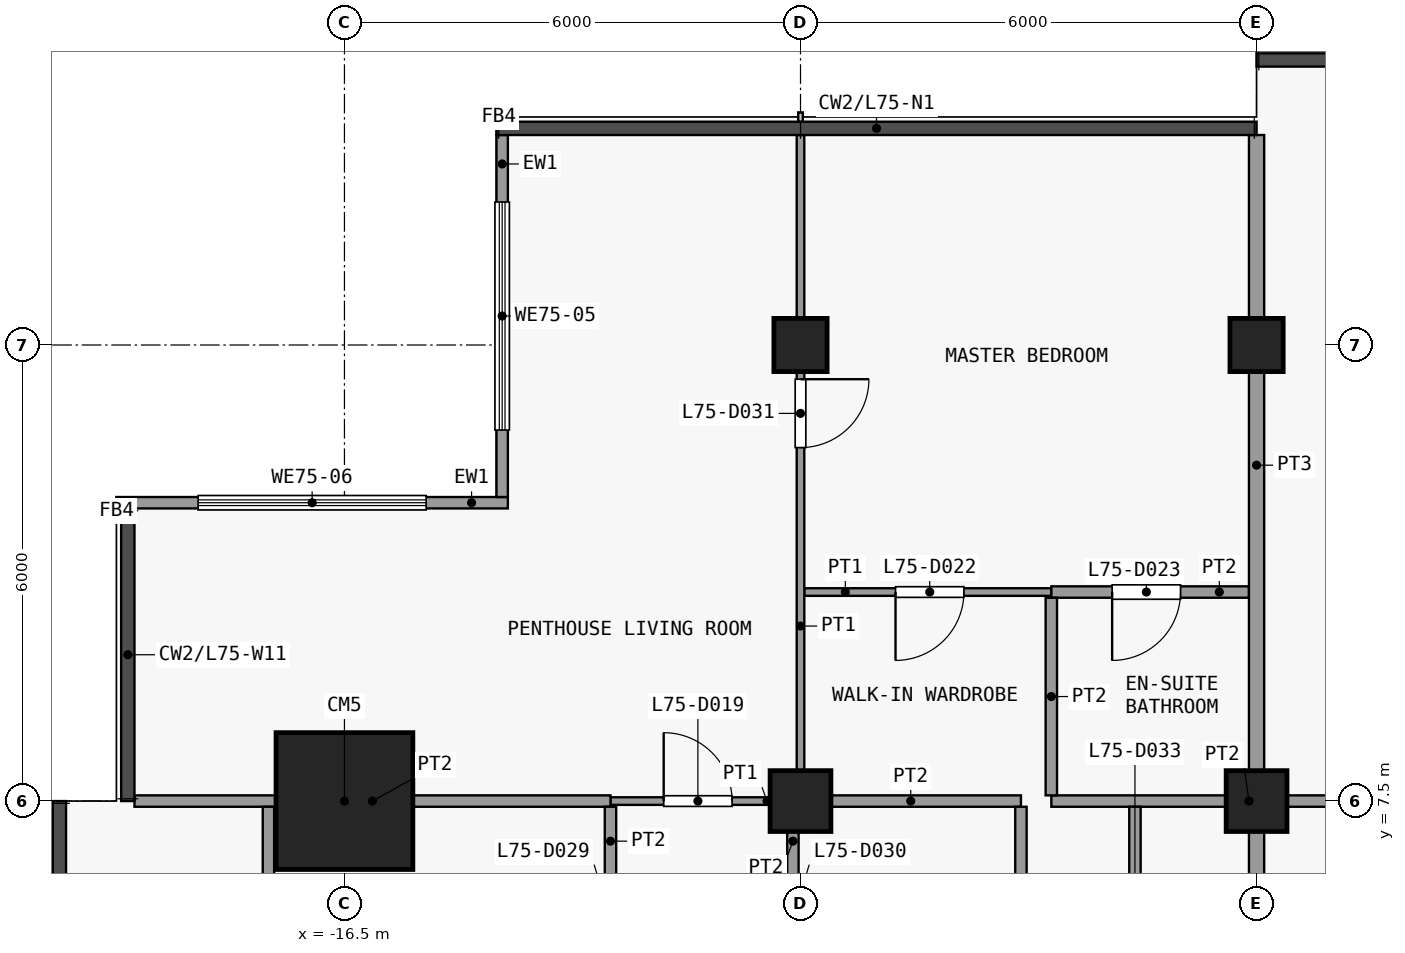
"""IFC4 building model, lengths in metres.
Left out: names, types, materials, properties, quantities, classifications, styles, units other than length and angle.
Written with IfcOpenShell. Run it as: python <this file> out.ifc"""

import sys

from ifc_helpers import new_model, si_unit, direction, frame, frame_2d, origin, origin_2d, place, context, subcontext, project, spatial, rectangle, extrude, element, fill, save


model = new_model("IFC4")
c1 = context("Model", 3, precision=1e-05, world=origin(), true_north=direction((0.0, 1.0)))
c2 = subcontext(c1, "Body", "Model", "MODEL_VIEW")
j1 = project(units=[si_unit("LENGTHUNIT", "METRE"), si_unit("PLANEANGLEUNIT", "RADIAN")], contexts=[c1])
p1 = place(None, origin())
s1 = spatial("IfcSite", under=j1, at=p1, CompositionType="ELEMENT")
p2 = place(p1, origin())
s2 = spatial("IfcBuilding", under=s1, at=p2, CompositionType="ELEMENT")
p3 = place(p2, frame((0.0, 0.0, 295.1)))
s3 = spatial("IfcBuildingStorey", under=s2, at=p3, CompositionType="ELEMENT", Elevation=295.1)
p4 = place(p3, frame((-16.5, 7.5, 0.0), z_axis=(0.0, 0.0, 1.0), x_axis=(1.0, 0.0, 0.0)))
e1 = element("IfcColumn", 1, at=p4, inside=s3, PredefinedType="COLUMN", context=c2, shape_type="SweptSolid", body=[
    extrude(rectangle(XDim=1.8, YDim=1.8, at=origin_2d()), origin(), (0.0, 0.0, 1.0), 3.6),
])
p5 = place(p3, frame((-10.5, 7.5, 0.0), z_axis=(0.0, 0.0, 1.0), x_axis=(1.0, 0.0, 0.0)))
e2 = element("IfcColumn", 2, at=p5, inside=s3, PredefinedType="COLUMN", context=c2, shape_type="SweptSolid", body=[
    extrude(rectangle(XDim=0.8, YDim=0.8, at=origin_2d()), origin(), (0.0, 0.0, 1.0), 3.6),
])
p6 = place(p3, frame((-10.5, 13.5, 0.0), z_axis=(0.0, 0.0, 1.0), x_axis=(1.0, 0.0, 0.0)))
e3 = element("IfcColumn", 3, at=p6, inside=s3, PredefinedType="COLUMN", context=c2, shape_type="SweptSolid", body=[
    extrude(rectangle(XDim=0.7, YDim=0.7, at=origin_2d()), origin(), (0.0, 0.0, 1.0), 3.6),
])
p7 = place(p3, frame((-4.5, 7.5, 0.0), z_axis=(0.0, 0.0, 1.0), x_axis=(1.0, 0.0, 0.0)))
e4 = element("IfcColumn", 4, at=p7, inside=s3, PredefinedType="COLUMN", context=c2, shape_type="SweptSolid", body=[
    extrude(rectangle(XDim=0.8, YDim=0.8, at=origin_2d()), origin(), (0.0, 0.0, 1.0), 3.6),
])
p8 = place(p3, frame((-4.5, 13.5, 0.0), z_axis=(0.0, 0.0, 1.0), x_axis=(1.0, 0.0, 0.0)))
e5 = element("IfcColumn", 5, at=p8, inside=s3, PredefinedType="COLUMN", context=c2, shape_type="SweptSolid", body=[
    extrude(rectangle(XDim=0.7, YDim=0.7, at=origin_2d()), origin(), (0.0, 0.0, 1.0), 3.6),
])
p9 = place(p3, frame((-14.425, 11.5, 0.0), z_axis=(0.0, 0.0, 1.0), x_axis=(0.0, 1.0, 0.0)))
e6 = element("IfcWall", 6, at=p9, inside=s3, PredefinedType="SOLIDWALL", context=c2, shape_type="SweptSolid", body=[
    extrude(rectangle(XDim=4.762, YDim=0.15, at=frame_2d((2.381, 0.0))), origin(), (0.0, 0.0, 1.0), 3.2),
])
p10 = place(p9, frame((0.881, 0.0, 0.9)))
e7 = element("IfcOpeningElement", 7, at=p10, cuts=e6, PredefinedType="OPENING", context=c2, shape_type="SweptSolid", body=[
    extrude(rectangle(XDim=3.0, YDim=2.4, at=frame_2d((1.5, 1.2))), frame((0.0, 0.085, 0.0), z_axis=(0.0, -1.0, 0.0), x_axis=(1.0, 0.0, 0.0)), (0.0, 0.0, 1.0), 0.17),
])
p11 = place(p3, frame((-19.5, 11.425, 0.0), z_axis=(0.0, 0.0, 1.0), x_axis=(1.0, 0.0, 0.0)))
e8 = element("IfcWall", 8, at=p11, inside=s3, PredefinedType="SOLIDWALL", context=c2, shape_type="SweptSolid", body=[
    extrude(rectangle(XDim=5.15, YDim=0.15, at=frame_2d((2.575, 0.0))), origin(), (0.0, 0.0, 1.0), 3.2),
])
p12 = place(p11, frame((1.075, 0.0, 0.9)))
e9 = element("IfcOpeningElement", 9, at=p12, cuts=e8, PredefinedType="OPENING", context=c2, shape_type="SweptSolid", body=[
    extrude(rectangle(XDim=3.0, YDim=2.4, at=frame_2d((1.5, 1.2))), frame((0.0, 0.085, 0.0), z_axis=(0.0, -1.0, 0.0), x_axis=(1.0, 0.0, 0.0)), (0.0, 0.0, 1.0), 0.17),
])
p13 = place(p3, frame((-13.0, 7.5, 0.0), z_axis=(0.0, 0.0, 1.0), x_axis=(1.0, 0.0, 0.0)))
e10 = element("IfcWall", 10, at=p13, inside=s3, PredefinedType="PARTITIONING", context=c2, shape_type="SweptSolid", body=[
    extrude(rectangle(XDim=2.4, YDim=0.1, at=frame_2d((1.2, 0.0))), origin(), (0.0, 0.0, 1.0), 3.2),
])
p14 = place(p13, frame((0.7, 0.0, 0.0)))
e11 = element("IfcOpeningElement", 11, at=p14, cuts=e10, PredefinedType="OPENING", context=c2, shape_type="SweptSolid", body=[
    extrude(rectangle(XDim=0.9, YDim=2.1, at=frame_2d((0.45, 1.05))), frame((0.0, 0.06, 0.0), z_axis=(0.0, -1.0, 0.0), x_axis=(1.0, 0.0, 0.0)), (0.0, 0.0, 1.0), 0.12),
])
p15 = place(p3, frame((-19.262, 7.5, 0.0), z_axis=(0.0, 0.0, 1.0), x_axis=(1.0, 0.0, 0.0)))
e12 = element("IfcWall", 12, at=p15, inside=s3, PredefinedType="PARTITIONING", context=c2, shape_type="SweptSolid", body=[
    extrude(rectangle(XDim=6.262, YDim=0.15, at=frame_2d((3.131, 0.0))), origin(), (0.0, 0.0, 1.0), 3.2),
])
p16 = place(p3, frame((-10.5, 7.5, 0.0), z_axis=(0.0, 0.0, 1.0), x_axis=(1.0, 0.0, 0.0)))
e13 = element("IfcWall", 13, at=p16, inside=s3, PredefinedType="PARTITIONING", context=c2, shape_type="SweptSolid", body=[
    extrude(rectangle(XDim=2.9, YDim=0.15, at=frame_2d((1.45, 0.0))), origin(), (0.0, 0.0, 1.0), 3.2),
])
p17 = place(p3, frame((-7.2, 7.5, 0.0), z_axis=(0.0, 0.0, 1.0), x_axis=(1.0, 0.0, 0.0)))
e14 = element("IfcWall", 14, at=p17, inside=s3, PredefinedType="PARTITIONING", context=c2, shape_type="SweptSolid", body=[
    extrude(rectangle(XDim=5.2, YDim=0.15, at=frame_2d((2.6, 0.0))), origin(), (0.0, 0.0, 1.0), 3.2),
])
p18 = place(p3, frame((-10.45, 10.25, 0.0), z_axis=(0.0, 0.0, 1.0), x_axis=(1.0, 0.0, 0.0)))
e15 = element("IfcWall", 15, at=p18, inside=s3, PredefinedType="PARTITIONING", context=c2, shape_type="SweptSolid", body=[
    extrude(rectangle(XDim=3.25, YDim=0.1, at=frame_2d((1.625, 0.0))), origin(), (0.0, 0.0, 1.0), 3.2),
])
p19 = place(p18, frame((1.2, 0.0, 0.0)))
e16 = element("IfcOpeningElement", 16, at=p19, cuts=e15, PredefinedType="OPENING", context=c2, shape_type="SweptSolid", body=[
    extrude(rectangle(XDim=0.9, YDim=2.1, at=frame_2d((0.45, 1.05))), frame((0.0, 0.06, 0.0), z_axis=(0.0, -1.0, 0.0), x_axis=(1.0, 0.0, 0.0)), (0.0, 0.0, 1.0), 0.12),
])
p20 = place(p3, frame((-7.2, 10.25, 0.0), z_axis=(0.0, 0.0, 1.0), x_axis=(1.0, 0.0, 0.0)))
e17 = element("IfcWall", 17, at=p20, inside=s3, PredefinedType="PARTITIONING", context=c2, shape_type="SweptSolid", body=[
    extrude(rectangle(XDim=2.6, YDim=0.15, at=frame_2d((1.3, 0.0))), origin(), (0.0, 0.0, 1.0), 3.2),
])
p21 = place(p20, frame((0.8, 0.0, 0.0)))
e18 = element("IfcOpeningElement", 18, at=p21, cuts=e17, PredefinedType="OPENING", context=c2, shape_type="SweptSolid", body=[
    extrude(rectangle(XDim=0.9, YDim=2.1, at=frame_2d((0.45, 1.05))), frame((0.0, 0.085, 0.0), z_axis=(0.0, -1.0, 0.0), x_axis=(1.0, 0.0, 0.0)), (0.0, 0.0, 1.0), 0.17),
])
p22 = place(p3, frame((-17.5, 4.6, 0.0), z_axis=(0.0, 0.0, 1.0), x_axis=(0.0, 1.0, 0.0)))
e19 = element("IfcWall", 19, at=p22, inside=s3, PredefinedType="PARTITIONING", context=c2, shape_type="SweptSolid", body=[
    extrude(rectangle(XDim=2.825, YDim=0.15, at=frame_2d((1.413, 0.0))), origin(), (0.0, 0.0, 1.0), 3.2),
])
p23 = place(p22, frame((1.0, 0.0, 0.0)))
e20 = element("IfcOpeningElement", 20, at=p23, cuts=e19, PredefinedType="OPENING", context=c2, shape_type="SweptSolid", body=[
    extrude(rectangle(XDim=0.9, YDim=2.1, at=frame_2d((0.45, 1.05))), frame((0.0, 0.085, 0.0), z_axis=(0.0, -1.0, 0.0), x_axis=(1.0, 0.0, 0.0)), (0.0, 0.0, 1.0), 0.17),
])
p24 = place(p3, frame((-13.0, 4.6, 0.0), z_axis=(0.0, 0.0, 1.0), x_axis=(0.0, 1.0, 0.0)))
e21 = element("IfcWall", 21, at=p24, inside=s3, PredefinedType="PARTITIONING", context=c2, shape_type="SweptSolid", body=[
    extrude(rectangle(XDim=2.825, YDim=0.15, at=frame_2d((1.413, 0.0))), origin(), (0.0, 0.0, 1.0), 3.2),
])
p25 = place(p24, frame((0.9, 0.0, 0.0)))
e22 = element("IfcOpeningElement", 22, at=p25, cuts=e21, PredefinedType="OPENING", context=c2, shape_type="SweptSolid", body=[
    extrude(rectangle(XDim=0.9, YDim=2.1, at=frame_2d((0.45, 1.05))), frame((0.0, 0.085, 0.0), z_axis=(0.0, -1.0, 0.0), x_axis=(1.0, 0.0, 0.0)), (0.0, 0.0, 1.0), 0.17),
])
p26 = place(p3, frame((-10.6, 4.6, 0.0), z_axis=(0.0, 0.0, 1.0), x_axis=(0.0, 1.0, 0.0)))
e23 = element("IfcWall", 23, at=p26, inside=s3, PredefinedType="PARTITIONING", context=c2, shape_type="SweptSolid", body=[
    extrude(rectangle(XDim=2.825, YDim=0.15, at=frame_2d((1.413, 0.0))), origin(), (0.0, 0.0, 1.0), 3.2),
])
p27 = place(p26, frame((0.9, 0.0, 0.0)))
e24 = element("IfcOpeningElement", 24, at=p27, cuts=e23, PredefinedType="OPENING", context=c2, shape_type="SweptSolid", body=[
    extrude(rectangle(XDim=0.9, YDim=2.1, at=frame_2d((0.45, 1.05))), frame((0.0, 0.085, 0.0), z_axis=(0.0, -1.0, 0.0), x_axis=(1.0, 0.0, 0.0)), (0.0, 0.0, 1.0), 0.17),
])
p28 = place(p3, frame((-10.5, 7.575, 0.0), z_axis=(0.0, 0.0, 1.0), x_axis=(0.0, 1.0, 0.0)))
e25 = element("IfcWall", 25, at=p28, inside=s3, PredefinedType="PARTITIONING", context=c2, shape_type="SweptSolid", body=[
    extrude(rectangle(XDim=8.688, YDim=0.1, at=frame_2d((4.344, 0.0))), origin(), (0.0, 0.0, 1.0), 3.2),
])
p29 = place(p28, frame((4.575, 0.0, 0.0)))
e26 = element("IfcOpeningElement", 26, at=p29, cuts=e25, PredefinedType="OPENING", context=c2, shape_type="SweptSolid", body=[
    extrude(rectangle(XDim=0.9, YDim=2.1, at=frame_2d((0.45, 1.05))), frame((0.0, 0.06, 0.0), z_axis=(0.0, -1.0, 0.0), x_axis=(1.0, 0.0, 0.0)), (0.0, 0.0, 1.0), 0.12),
])
p30 = place(p3, frame((-7.6, 4.6, 0.0), z_axis=(0.0, 0.0, 1.0), x_axis=(0.0, 1.0, 0.0)))
e27 = element("IfcWall", 27, at=p30, inside=s3, PredefinedType="PARTITIONING", context=c2, shape_type="SweptSolid", body=[
    extrude(rectangle(XDim=2.825, YDim=0.15, at=frame_2d((1.413, 0.0))), origin(), (0.0, 0.0, 1.0), 3.2),
])
p31 = place(p30, frame((1.0, 0.0, 0.0)))
e28 = element("IfcOpeningElement", 28, at=p31, cuts=e27, PredefinedType="OPENING", context=c2, shape_type="SweptSolid", body=[
    extrude(rectangle(XDim=0.9, YDim=2.1, at=frame_2d((0.45, 1.05))), frame((0.0, 0.085, 0.0), z_axis=(0.0, -1.0, 0.0), x_axis=(1.0, 0.0, 0.0)), (0.0, 0.0, 1.0), 0.17),
])
p32 = place(p3, frame((-7.2, 7.575, 0.0), z_axis=(0.0, 0.0, 1.0), x_axis=(0.0, 1.0, 0.0)))
e29 = element("IfcWall", 29, at=p32, inside=s3, PredefinedType="PARTITIONING", context=c2, shape_type="SweptSolid", body=[
    extrude(rectangle(XDim=2.6, YDim=0.15, at=frame_2d((1.3, 0.0))), origin(), (0.0, 0.0, 1.0), 3.2),
])
p33 = place(p3, frame((-6.1, 4.6, 0.0), z_axis=(0.0, 0.0, 1.0), x_axis=(0.0, 1.0, 0.0)))
e30 = element("IfcWall", 30, at=p33, inside=s3, PredefinedType="PARTITIONING", context=c2, shape_type="SweptSolid", body=[
    extrude(rectangle(XDim=2.825, YDim=0.15, at=frame_2d((1.413, 0.0))), origin(), (0.0, 0.0, 1.0), 3.2),
])
p34 = place(p33, frame((1.0, 0.0, 0.0)))
e31 = element("IfcOpeningElement", 31, at=p34, cuts=e30, PredefinedType="OPENING", context=c2, shape_type="SweptSolid", body=[
    extrude(rectangle(XDim=0.9, YDim=2.1, at=frame_2d((0.45, 1.05))), frame((0.0, 0.085, 0.0), z_axis=(0.0, -1.0, 0.0), x_axis=(1.0, 0.0, 0.0)), (0.0, 0.0, 1.0), 0.17),
])
p35 = place(p3, frame((-4.5, 4.6, 0.0), z_axis=(0.0, 0.0, 1.0), x_axis=(0.0, 1.0, 0.0)))
e32 = element("IfcWall", 32, at=p35, inside=s3, PredefinedType="PARTITIONING", context=c2, shape_type="SweptSolid", body=[
    extrude(rectangle(XDim=2.825, YDim=0.2, at=frame_2d((1.413, 0.0))), origin(), (0.0, 0.0, 1.0), 3.2),
])
p36 = place(p3, frame((-4.5, 7.575, 0.0), z_axis=(0.0, 0.0, 1.0), x_axis=(0.0, 1.0, 0.0)))
e33 = element("IfcWall", 33, at=p36, inside=s3, PredefinedType="PARTITIONING", context=c2, shape_type="SweptSolid", body=[
    extrude(rectangle(XDim=8.688, YDim=0.2, at=frame_2d((4.344, 0.0))), origin(), (0.0, 0.0, 1.0), 3.2),
])
p37 = place(p10, origin())
e34 = element("IfcWindow", 34, at=p37, inside=s3, PartitioningType="SINGLE_PANEL", PredefinedType="WINDOW", context=c2, shape_type="SweptSolid", body=[
    extrude(rectangle(XDim=3.0, YDim=2.4, at=frame_2d((1.5, 1.2))), frame((0.0, 0.03, 0.0), z_axis=(0.0, -1.0, 0.0), x_axis=(1.0, 0.0, 0.0)), (0.0, 0.0, 1.0), 0.06),
])
fill(e7, e34)
p38 = place(p12, origin())
e35 = element("IfcWindow", 35, at=p38, inside=s3, PartitioningType="SINGLE_PANEL", PredefinedType="WINDOW", context=c2, shape_type="SweptSolid", body=[
    extrude(rectangle(XDim=3.0, YDim=2.4, at=frame_2d((1.5, 1.2))), frame((0.0, 0.03, 0.0), z_axis=(0.0, -1.0, 0.0), x_axis=(1.0, 0.0, 0.0)), (0.0, 0.0, 1.0), 0.06),
])
fill(e9, e35)
p39 = place(p14, origin())
e36 = element("IfcDoor", 36, at=p39, inside=s3, OperationType="SINGLE_SWING_RIGHT", PredefinedType="DOOR", context=c2, shape_type="SweptSolid", body=[
    extrude(rectangle(XDim=0.9, YDim=2.1, at=frame_2d((0.45, 1.05))), frame((0.0, 0.025, 0.0), z_axis=(0.0, -1.0, 0.0), x_axis=(1.0, 0.0, 0.0)), (0.0, 0.0, 1.0), 0.05),
])
fill(e11, e36)
p40 = place(p19, origin())
e37 = element("IfcDoor", 37, at=p40, inside=s3, OperationType="SINGLE_SWING_LEFT", PredefinedType="DOOR", context=c2, shape_type="SweptSolid", body=[
    extrude(rectangle(XDim=0.9, YDim=2.1, at=frame_2d((0.45, 1.05))), frame((0.0, 0.025, 0.0), z_axis=(0.0, -1.0, 0.0), x_axis=(1.0, 0.0, 0.0)), (0.0, 0.0, 1.0), 0.05),
])
fill(e16, e37)
p41 = place(p21, origin())
e38 = element("IfcDoor", 38, at=p41, inside=s3, OperationType="SINGLE_SWING_LEFT", PredefinedType="DOOR", context=c2, shape_type="SweptSolid", body=[
    extrude(rectangle(XDim=0.9, YDim=2.1, at=frame_2d((0.45, 1.05))), frame((0.0, 0.025, 0.0), z_axis=(0.0, -1.0, 0.0), x_axis=(1.0, 0.0, 0.0)), (0.0, 0.0, 1.0), 0.05),
])
fill(e18, e38)
p42 = place(p29, origin())
e39 = element("IfcDoor", 39, at=p42, inside=s3, OperationType="SINGLE_SWING_RIGHT", PredefinedType="DOOR", context=c2, shape_type="SweptSolid", body=[
    extrude(rectangle(XDim=0.9, YDim=2.1, at=frame_2d((0.45, 1.05))), frame((0.0, 0.025, 0.0), z_axis=(0.0, -1.0, 0.0), x_axis=(1.0, 0.0, 0.0)), (0.0, 0.0, 1.0), 0.05),
])
fill(e26, e39)
save(model, sys.argv[1])
